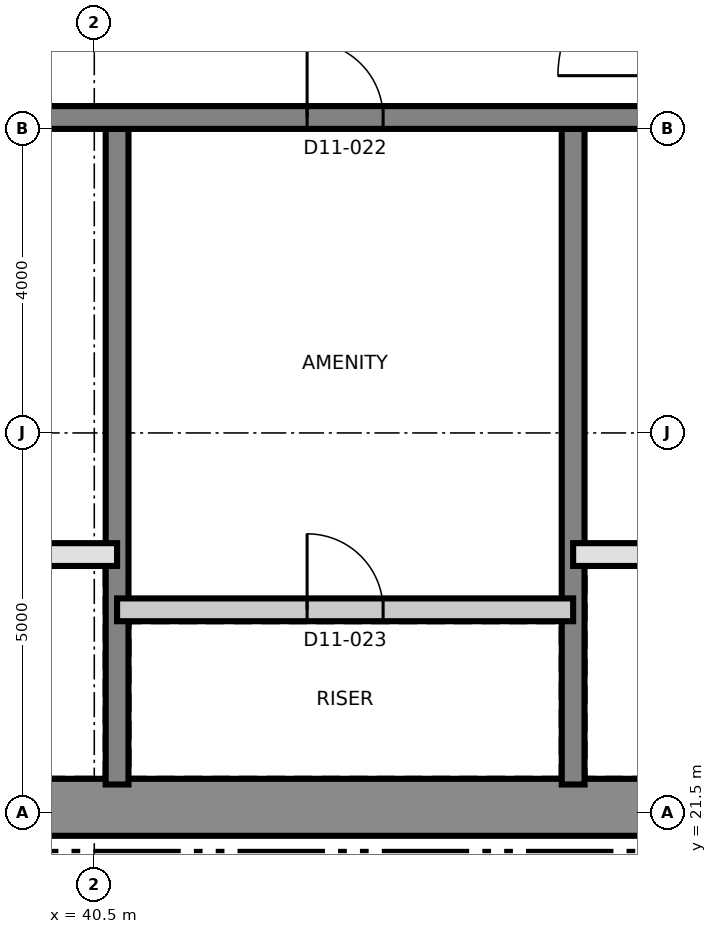
"""IFC4 building model, lengths in metres.
Left out: names, types, materials, properties, quantities, classifications, styles, units other than length and angle.
Written with IfcOpenShell. Run it as: python <this file> out.ifc"""

import sys

from ifc_helpers import new_model, si_unit, direction, frame, frame_2d, origin, place, context, subcontext, project, spatial, rectangle, extrude, element, fill, save


model = new_model("IFC4")
c1 = context("Model", 3, precision=1e-05, world=origin(), true_north=direction((0.0, 1.0)))
c2 = subcontext(c1, "Body", "Model", "MODEL_VIEW")
j1 = project(units=[si_unit("LENGTHUNIT", "METRE"), si_unit("PLANEANGLEUNIT", "RADIAN")], contexts=[c1])
p1 = place(None, origin())
s1 = spatial("IfcSite", under=j1, at=p1, CompositionType="ELEMENT")
p2 = place(p1, origin())
s2 = spatial("IfcBuilding", under=s1, at=p2, CompositionType="ELEMENT")
p3 = place(p2, frame((0.0, 0.0, 127.8)))
s3 = spatial("IfcBuildingStorey", under=s2, at=p3, CompositionType="ELEMENT", Elevation=127.8)
p4 = place(p3, frame((31.125, 21.575, 0.0), z_axis=(0.0, 0.0, 1.0), x_axis=(1.0, 0.0, 0.0)))
e1 = element("IfcWall", 1, at=p4, inside=s3, PredefinedType="SHEAR", context=c2, shape_type="SweptSolid", body=[
    extrude(rectangle(XDim=27.0, YDim=0.75, at=frame_2d((13.5, 0.0))), origin(), (0.0, 0.0, 1.0), 3.7),
])
for number, where, z_axis, x_axis in (
    (2, (40.8, 21.875, 0.0), (0.0, 0.0, 1.0), (0.0, 1.0, 0.0)),
    (3, (46.8, 21.875, 0.0), (0.0, 0.0, 1.0), (0.0, 1.0, 0.0)),
):
    element("IfcWall", number, at=place(p3, frame(where, z_axis=z_axis, x_axis=x_axis)), inside=s3, PredefinedType="SHEAR", context=c2, shape_type="SweptSolid", body=[
        extrude(rectangle(XDim=8.625, YDim=0.3, at=frame_2d((4.312, 0.0))), origin(), (0.0, 0.0, 1.0), 3.7),
    ])
p5 = place(p3, frame((31.875, 30.65, 0.0), z_axis=(0.0, 0.0, 1.0), x_axis=(1.0, 0.0, 0.0)))
e4 = element("IfcWall", 4, at=p5, inside=s3, PredefinedType="SHEAR", context=c2, shape_type="SweptSolid", body=[
    extrude(rectangle(XDim=26.25, YDim=0.3, at=frame_2d((13.125, 0.0))), origin(), (0.0, 0.0, 1.0), 3.7),
])
p6 = place(p5, frame((24.625, 0.0, 0.0)))
e5 = element("IfcOpeningElement", 5, at=p6, cuts=e4, PredefinedType="OPENING", context=c2, shape_type="SweptSolid", body=[
    extrude(rectangle(XDim=1.0, YDim=2.1, at=frame_2d((0.5, 1.05))), frame((0.0, 0.16, 0.0), z_axis=(0.0, -1.0, 0.0), x_axis=(1.0, 0.0, 0.0)), (0.0, 0.0, 1.0), 0.32),
])
p7 = place(p5, frame((11.425, 0.0, 0.0)))
e6 = element("IfcOpeningElement", 6, at=p7, cuts=e4, PredefinedType="OPENING", context=c2, shape_type="SweptSolid", body=[
    extrude(rectangle(XDim=1.0, YDim=2.1, at=frame_2d((0.5, 1.05))), frame((0.0, 0.16, 0.0), z_axis=(0.0, -1.0, 0.0), x_axis=(1.0, 0.0, 0.0)), (0.0, 0.0, 1.0), 0.32),
])
p8 = place(p3, frame((39.101, 20.842, 0.0), z_axis=(0.0, 0.0, 1.0), x_axis=(0.946930456305, -0.32143850255, 0.0)))
e7 = element("IfcWall", 7, at=p8, inside=s3, PredefinedType="SOLIDWALL", context=c2, shape_type="SweptSolid", body=[
    extrude(rectangle(XDim=1.32, YDim=0.3, at=frame_2d((0.66, 0.0))), origin(), (0.0, 0.0, 1.0), 3.4),
])
p9 = place(p3, frame((40.8, 24.173, 0.0), z_axis=(0.0, 0.0, 1.0), x_axis=(1.0, 0.0, 0.0)))
e8 = element("IfcWall", 8, at=p9, inside=s3, PredefinedType="PARTITIONING", context=c2, shape_type="SweptSolid", body=[
    extrude(rectangle(XDim=6.0, YDim=0.3, at=frame_2d((3.0, 0.0))), origin(), (0.0, 0.0, 1.0), 3.4),
])
p10 = place(p9, frame((2.5, 0.0, 0.0)))
e9 = element("IfcOpeningElement", 9, at=p10, cuts=e8, PredefinedType="OPENING", context=c2, shape_type="SweptSolid", body=[
    extrude(rectangle(XDim=1.0, YDim=2.1, at=frame_2d((0.5, 1.05))), frame((0.0, 0.16, 0.0), z_axis=(0.0, -1.0, 0.0), x_axis=(1.0, 0.0, 0.0)), (0.0, 0.0, 1.0), 0.32),
])
p11 = place(p3, frame((31.8, 24.9, 0.0), z_axis=(0.0, 0.0, 1.0), x_axis=(1.0, 0.0, 0.0)))
e10 = element("IfcWall", 10, at=p11, inside=s3, PredefinedType="SOLIDWALL", context=c2, shape_type="SweptSolid", body=[
    extrude(rectangle(XDim=9.0, YDim=0.3, at=frame_2d((4.5, 0.0))), origin(), (0.0, 0.0, 1.0), 3.4),
])
p12 = place(p11, frame((7.05, 0.0, 0.0)))
e11 = element("IfcOpeningElement", 11, at=p12, cuts=e10, PredefinedType="OPENING", context=c2, shape_type="SweptSolid", body=[
    extrude(rectangle(XDim=0.9, YDim=2.1, at=frame_2d((0.45, 1.05))), frame((0.0, 0.16, 0.0), z_axis=(0.0, -1.0, 0.0), x_axis=(1.0, 0.0, 0.0)), (0.0, 0.0, 1.0), 0.32),
])
p13 = place(p11, frame((0.95, 0.0, 0.0)))
e12 = element("IfcOpeningElement", 12, at=p13, cuts=e10, PredefinedType="OPENING", context=c2, shape_type="SweptSolid", body=[
    extrude(rectangle(XDim=1.1, YDim=2.4, at=frame_2d((0.55, 1.2))), frame((0.0, 0.16, 0.0), z_axis=(0.0, -1.0, 0.0), x_axis=(1.0, 0.0, 0.0)), (0.0, 0.0, 1.0), 0.32),
])
p14 = place(p11, frame((3.95, 0.0, 0.0)))
e13 = element("IfcOpeningElement", 13, at=p14, cuts=e10, PredefinedType="OPENING", context=c2, shape_type="SweptSolid", body=[
    extrude(rectangle(XDim=1.1, YDim=2.4, at=frame_2d((0.55, 1.2))), frame((0.0, 0.16, 0.0), z_axis=(0.0, -1.0, 0.0), x_axis=(1.0, 0.0, 0.0)), (0.0, 0.0, 1.0), 0.32),
])
p15 = place(p3, frame((46.8, 24.9, 0.0), z_axis=(0.0, 0.0, 1.0), x_axis=(1.0, 0.0, 0.0)))
e14 = element("IfcWall", 14, at=p15, inside=s3, PredefinedType="SOLIDWALL", context=c2, shape_type="SweptSolid", body=[
    extrude(rectangle(XDim=9.0, YDim=0.3, at=frame_2d((4.5, 0.0))), origin(), (0.0, 0.0, 1.0), 3.4),
])
p16 = place(p15, frame((1.75, 0.0, 0.0)))
e15 = element("IfcOpeningElement", 15, at=p16, cuts=e14, PredefinedType="OPENING", context=c2, shape_type="SweptSolid", body=[
    extrude(rectangle(XDim=0.9, YDim=2.1, at=frame_2d((0.45, 1.05))), frame((0.0, 0.16, 0.0), z_axis=(0.0, -1.0, 0.0), x_axis=(1.0, 0.0, 0.0)), (0.0, 0.0, 1.0), 0.32),
])
p17 = place(p7, origin())
e16 = element("IfcDoor", 16, at=p17, inside=s3, OperationType="SINGLE_SWING_LEFT", PredefinedType="DOOR", context=c2, shape_type="SweptSolid", body=[
    extrude(rectangle(XDim=1.0, YDim=2.1, at=frame_2d((0.5, 1.05))), frame((0.0, 0.025, 0.0), z_axis=(0.0, -1.0, 0.0), x_axis=(1.0, 0.0, 0.0)), (0.0, 0.0, 1.0), 0.05),
])
fill(e6, e16)
p18 = place(p10, origin())
e17 = element("IfcDoor", 17, at=p18, inside=s3, OperationType="SINGLE_SWING_RIGHT", PredefinedType="DOOR", context=c2, shape_type="SweptSolid", body=[
    extrude(rectangle(XDim=1.0, YDim=2.1, at=frame_2d((0.5, 1.05))), frame((0.0, 0.025, 0.0), z_axis=(0.0, -1.0, 0.0), x_axis=(1.0, 0.0, 0.0)), (0.0, 0.0, 1.0), 0.05),
])
fill(e9, e17)
save(model, sys.argv[1])
